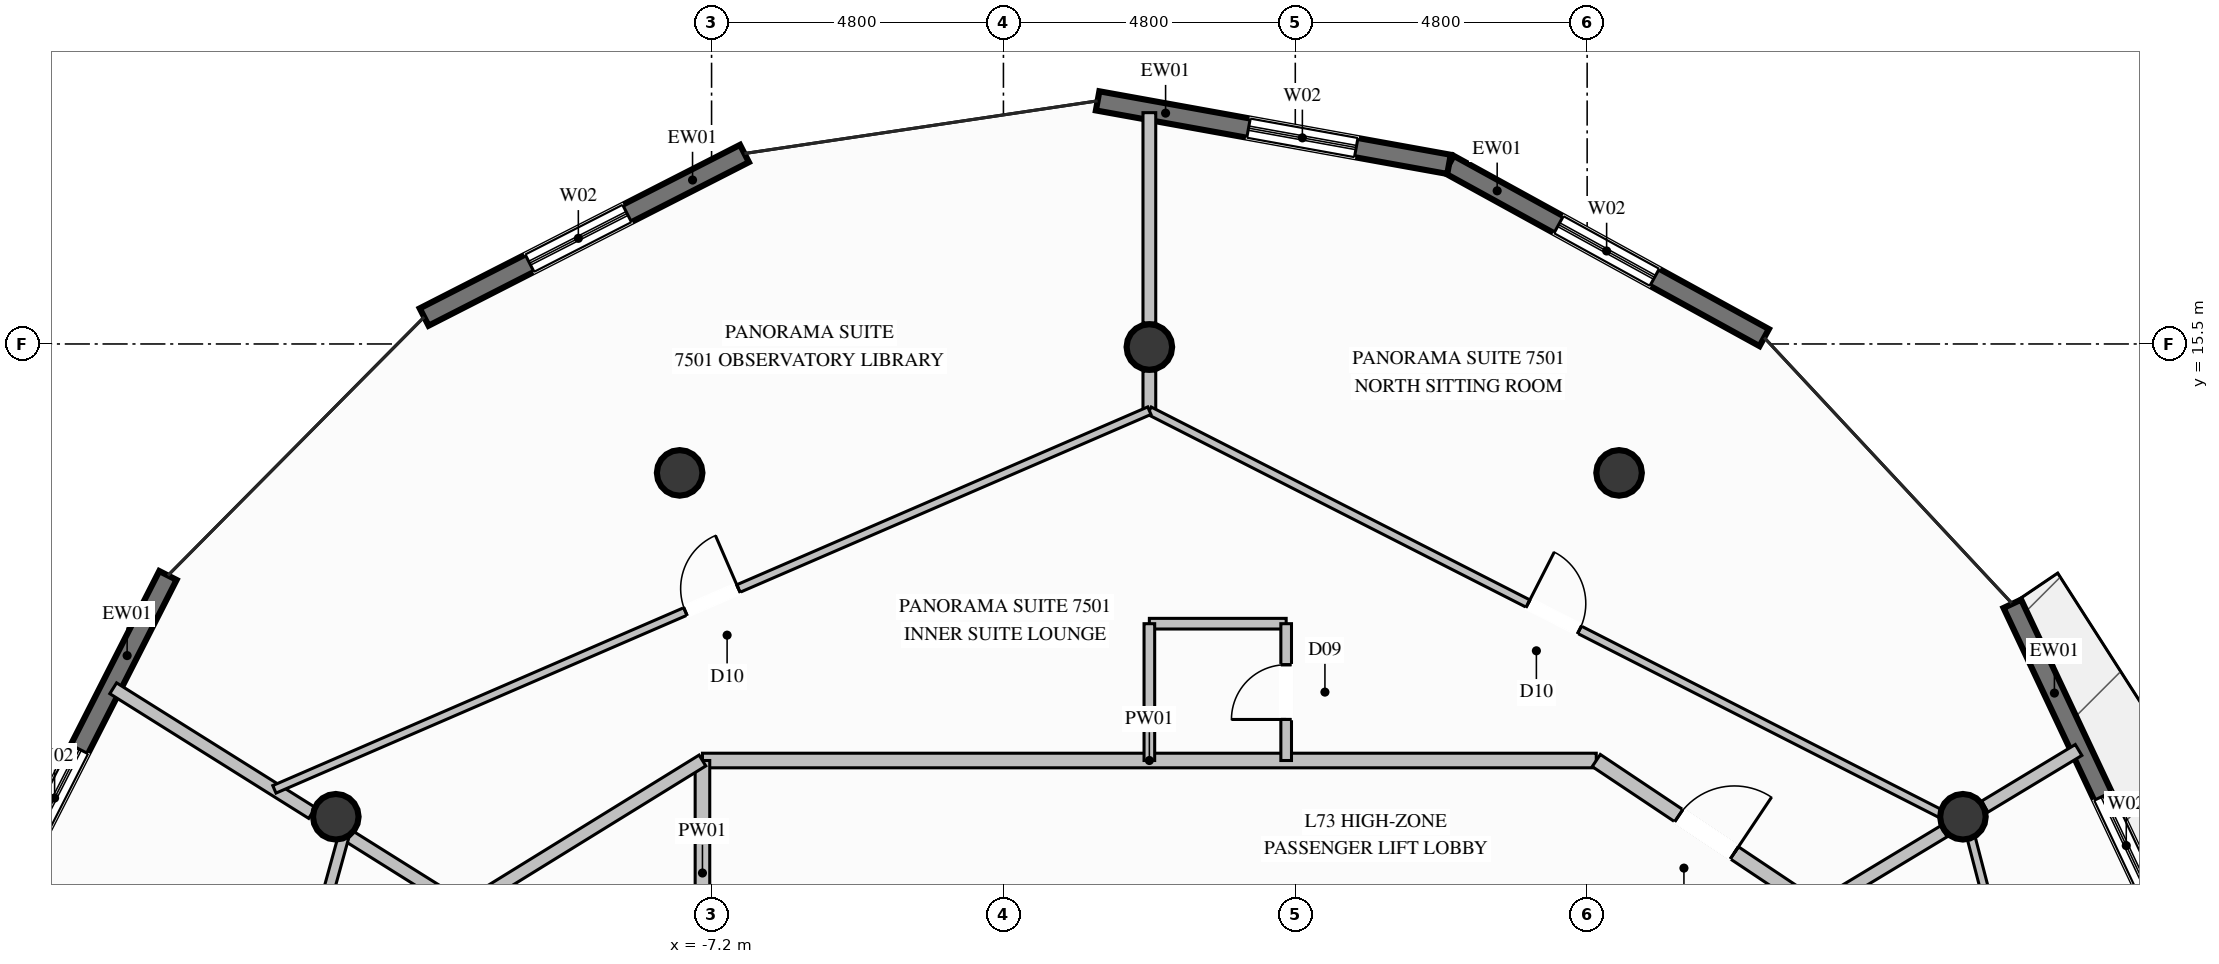
"""IFC4 building model, lengths in metres.
Left out: names, types, materials, properties, quantities, classifications, styles, units other than length and angle.
Written with IfcOpenShell. Run it as: python <this file> out.ifc"""

import sys

from ifc_helpers import new_model, si_unit, direction, frame, frame_2d, origin, origin_2d, place, context, subcontext, project, spatial, rectangle, circle, extrude, element, fill, save


model = new_model("IFC4")
c1 = context("Model", 3, precision=1e-05, world=origin(), true_north=direction((0.0, 1.0)))
c2 = subcontext(c1, "Body", "Model", "MODEL_VIEW")
j1 = project(units=[si_unit("LENGTHUNIT", "METRE"), si_unit("PLANEANGLEUNIT", "RADIAN")], contexts=[c1])
p1 = place(None, origin())
s1 = spatial("IfcSite", under=j1, at=p1, CompositionType="ELEMENT")
p2 = place(p1, origin())
s2 = spatial("IfcBuilding", under=s1, at=p2, CompositionType="ELEMENT")
p3 = place(p2, frame((0.0, 0.0, 282.0)))
s3 = spatial("IfcBuildingStorey", under=s2, at=p3, CompositionType="ELEMENT", Elevation=282.0)
for number, where, z_axis, x_axis in (
    (1, (13.38, 7.725, 0.0), (0.0, 0.0, 1.0), (1.0, 0.0, 0.0)),
    (2, (7.725, 13.38, 0.0), (0.0, 0.0, 1.0), (1.0, 0.0, 0.0)),
    (3, (0.0, 15.45, 0.0), (0.0, 0.0, 1.0), (1.0, 0.0, 0.0)),
    (4, (-7.725, 13.38, 0.0), (0.0, 0.0, 1.0), (1.0, 0.0, 0.0)),
    (5, (-13.38, 7.725, 0.0), (0.0, 0.0, 1.0), (1.0, 0.0, 0.0)),
):
    element("IfcColumn", number, at=place(p3, frame(where, z_axis=z_axis, x_axis=x_axis)), inside=s3, PredefinedType="COLUMN", context=c2, shape_type="SweptSolid", body=[
        extrude(circle(Radius=0.375, at=origin_2d()), origin(), (0.0, 0.0, 1.0), 3.8),
    ])
p4 = place(p3, frame((14.193, 11.227, 0.0), z_axis=(0.0, 0.0, 1.0), x_axis=(0.426183517714, -0.904636727769, 0.0)))
e6 = element("IfcWall", 6, at=p4, inside=s3, PredefinedType="SOLIDWALL", context=c2, shape_type="SweptSolid", body=[
    extrude(rectangle(XDim=6.053, YDim=0.32, at=frame_2d((3.027, 0.0))), origin(), (0.0, 0.0, 1.0), 3.57),
])
p5 = place(p4, frame((3.496, 0.0, 0.35)))
e7 = element("IfcOpeningElement", 7, at=p5, cuts=e6, PredefinedType="OPENING", context=c2, shape_type="SweptSolid", body=[
    extrude(rectangle(XDim=1.8, YDim=2.6, at=frame_2d((0.9, 1.3))), frame((0.0, 0.17, 0.0), z_axis=(0.0, -1.0, 0.0), x_axis=(1.0, 0.0, 0.0)), (0.0, 0.0, 1.0), 0.34),
])
p6 = place(p3, frame((4.928, 18.454, 0.0), z_axis=(0.0, 0.0, 1.0), x_axis=(0.876367486065, -0.481643051822, 0.0)))
e8 = element("IfcWall", 8, at=p6, inside=s3, PredefinedType="SOLIDWALL", context=c2, shape_type="SweptSolid", body=[
    extrude(rectangle(XDim=5.916, YDim=0.32, at=frame_2d((2.958, 0.0))), origin(), (0.0, 0.0, 1.0), 3.57),
])
p7 = place(p6, frame((2.058, 0.0, 0.35)))
e9 = element("IfcOpeningElement", 9, at=p7, cuts=e8, PredefinedType="OPENING", context=c2, shape_type="SweptSolid", body=[
    extrude(rectangle(XDim=1.8, YDim=2.6, at=frame_2d((0.9, 1.3))), frame((0.0, 0.17, 0.0), z_axis=(0.0, -1.0, 0.0), x_axis=(1.0, 0.0, 0.0)), (0.0, 0.0, 1.0), 0.34),
])
p8 = place(p3, frame((-0.851, 19.498, 0.0), z_axis=(0.0, 0.0, 1.0), x_axis=(0.984072814276, -0.177765846557, 0.0)))
e10 = element("IfcWall", 10, at=p8, inside=s3, PredefinedType="SOLIDWALL", context=c2, shape_type="SweptSolid", body=[
    extrude(rectangle(XDim=5.873, YDim=0.32, at=frame_2d((2.936, 0.0))), origin(), (0.0, 0.0, 1.0), 3.57),
])
p9 = place(p8, frame((2.522, 0.0, 0.35)))
e11 = element("IfcOpeningElement", 11, at=p9, cuts=e10, PredefinedType="OPENING", context=c2, shape_type="SweptSolid", body=[
    extrude(rectangle(XDim=1.8, YDim=2.6, at=frame_2d((0.9, 1.3))), frame((0.0, 0.17, 0.0), z_axis=(0.0, -1.0, 0.0), x_axis=(1.0, 0.0, 0.0)), (0.0, 0.0, 1.0), 0.34),
])
p10 = place(p3, frame((-11.927, 15.943, 0.0), z_axis=(0.0, 0.0, 1.0), x_axis=(0.890681374573, 0.454628077651, 0.0)))
e12 = element("IfcWall", 12, at=p10, inside=s3, PredefinedType="SOLIDWALL", context=c2, shape_type="SweptSolid", body=[
    extrude(rectangle(XDim=5.915, YDim=0.32, at=frame_2d((2.957, 0.0))), origin(), (0.0, 0.0, 1.0), 3.57),
])
p11 = place(p10, frame((1.947, 0.0, 0.35)))
e13 = element("IfcOpeningElement", 13, at=p11, cuts=e12, PredefinedType="OPENING", context=c2, shape_type="SweptSolid", body=[
    extrude(rectangle(XDim=1.8, YDim=2.6, at=frame_2d((0.9, 1.3))), frame((0.0, 0.17, 0.0), z_axis=(0.0, -1.0, 0.0), x_axis=(1.0, 0.0, 0.0)), (0.0, 0.0, 1.0), 0.34),
])
p12 = place(p3, frame((-18.888, 6.299, 0.0), z_axis=(0.0, 0.0, 1.0), x_axis=(0.453783790234, 0.891111817743, 0.0)))
e14 = element("IfcWall", 14, at=p12, inside=s3, PredefinedType="SOLIDWALL", context=c2, shape_type="SweptSolid", body=[
    extrude(rectangle(XDim=6.053, YDim=0.32, at=frame_2d((3.027, 0.0))), origin(), (0.0, 0.0, 1.0), 3.57),
])
p13 = place(p12, frame((1.046, 0.0, 0.35)))
e15 = element("IfcOpeningElement", 15, at=p13, cuts=e14, PredefinedType="OPENING", context=c2, shape_type="SweptSolid", body=[
    extrude(rectangle(XDim=1.8, YDim=2.6, at=frame_2d((0.9, 1.3))), frame((0.0, 0.17, 0.0), z_axis=(0.0, -1.0, 0.0), x_axis=(1.0, 0.0, 0.0)), (0.0, 0.0, 1.0), 0.34),
])
p14 = place(p3, frame((-7.35, 8.65, 0.0), z_axis=(0.0, 0.0, 1.0), x_axis=(1.0, 0.0, 0.0)))
e16 = element("IfcWall", 16, at=p14, inside=s3, PredefinedType="PARTITIONING", context=c2, shape_type="SweptSolid", body=[
    extrude(rectangle(XDim=14.7, YDim=0.24, at=frame_2d((7.35, 0.0))), origin(), (0.0, 0.0, 1.0), 3.57),
])
p15 = place(p3, frame((-7.35, 4.95, 0.0), z_axis=(0.0, 0.0, 1.0), x_axis=(0.0, 1.0, 0.0)))
e17 = element("IfcWall", 17, at=p15, inside=s3, PredefinedType="PARTITIONING", context=c2, shape_type="SweptSolid", body=[
    extrude(rectangle(XDim=3.7, YDim=0.24, at=frame_2d((1.85, 0.0))), origin(), (0.0, 0.0, 1.0), 2.655),
])
p16 = place(p3, frame((10.978, 6.225, 0.0), z_axis=(0.0, 0.0, 1.0), x_axis=(0.856173916647, 0.516687743664, 0.0)))
e18 = element("IfcWall", 18, at=p16, inside=s3, PredefinedType="PARTITIONING", context=c2, shape_type="SweptSolid", body=[
    extrude(rectangle(XDim=2.439, YDim=0.21, at=frame_2d((1.219, 0.0))), origin(), (0.0, 0.0, 1.0), 3.085),
])
p17 = place(p3, frame((13.738, 7.891, 0.0), z_axis=(0.0, 0.0, 1.0), x_axis=(0.856140161033, 0.516743674045, 0.0)))
e19 = element("IfcWall", 19, at=p17, inside=s3, PredefinedType="PARTITIONING", context=c2, shape_type="SweptSolid", body=[
    extrude(rectangle(XDim=1.803, YDim=0.21, at=frame_2d((0.902, 0.0))), origin(), (0.0, 0.0, 1.0), 3.57),
])
p18 = place(p3, frame((-11.278, 6.225, 0.0), z_axis=(0.0, 0.0, 1.0), x_axis=(-0.847328563413, 0.531069021525, 0.0)))
e20 = element("IfcWall", 20, at=p18, inside=s3, PredefinedType="PARTITIONING", context=c2, shape_type="SweptSolid", body=[
    extrude(rectangle(XDim=2.214, YDim=0.21, at=frame_2d((1.107, 0.0))), origin(), (0.0, 0.0, 1.0), 3.085),
])
p19 = place(p3, frame((-13.77, 7.787, 0.0), z_axis=(0.0, 0.0, 1.0), x_axis=(-0.847251407525, 0.531192105031, 0.0)))
e21 = element("IfcWall", 21, at=p19, inside=s3, PredefinedType="PARTITIONING", context=c2, shape_type="SweptSolid", body=[
    extrude(rectangle(XDim=3.861, YDim=0.21, at=frame_2d((1.93, 0.0))), origin(), (0.0, 0.0, 1.0), 3.57),
])
p20 = place(p3, frame((0.0, 10.9, 0.0), z_axis=(0.0, 0.0, 1.0), x_axis=(1.0, 0.0, 0.0)))
e22 = element("IfcWall", 22, at=p20, inside=s3, PredefinedType="PLUMBINGWALL", context=c2, shape_type="SweptSolid", body=[
    extrude(rectangle(XDim=2.25, YDim=0.175, at=frame_2d((1.125, 0.0))), origin(), (0.0, 0.0, 1.0), 3.252),
])
p21 = place(p3, frame((0.0, 10.9, 0.0), z_axis=(0.0, 0.0, 1.0), x_axis=(0.0, -1.0, 0.0)))
e23 = element("IfcWall", 23, at=p21, inside=s3, PredefinedType="PLUMBINGWALL", context=c2, shape_type="SweptSolid", body=[
    extrude(rectangle(XDim=2.25, YDim=0.175, at=frame_2d((1.125, 0.0))), origin(), (0.0, 0.0, 1.0), 3.57),
])
p22 = place(p3, frame((2.25, 8.65, 0.0), z_axis=(0.0, 0.0, 1.0), x_axis=(0.0, 1.0, 0.0)))
e24 = element("IfcWall", 24, at=p22, inside=s3, PredefinedType="PLUMBINGWALL", context=c2, shape_type="SweptSolid", body=[
    extrude(rectangle(XDim=2.25, YDim=0.175, at=frame_2d((1.125, 0.0))), origin(), (0.0, 0.0, 1.0), 3.57),
])
p23 = place(p22, frame((0.675, 0.0, 0.0)))
e25 = element("IfcOpeningElement", 25, at=p23, cuts=e24, PredefinedType="OPENING", context=c2, shape_type="SweptSolid", body=[
    extrude(rectangle(XDim=0.9, YDim=2.1, at=frame_2d((0.45, 1.05))), frame((0.0, 0.098, 0.0), z_axis=(0.0, -1.0, 0.0), x_axis=(1.0, 0.0, 0.0)), (0.0, 0.0, 1.0), 0.195),
])
p24 = place(p3, frame((-11.278, 6.225, 0.0), z_axis=(0.0, 0.0, 1.0), x_axis=(0.85092385233, 0.525289060933, 0.0)))
e26 = element("IfcWall", 26, at=p24, inside=s3, PredefinedType="PARTITIONING", context=c2, shape_type="SweptSolid", body=[
    extrude(rectangle(XDim=4.616, YDim=0.21, at=frame_2d((2.308, 0.0))), origin(), (0.0, 0.0, 1.0), 3.57),
])
p25 = place(p3, frame((7.35, 8.65, 0.0), z_axis=(0.0, 0.0, 1.0), x_axis=(0.831395547998, -0.555681062094, 0.0)))
e27 = element("IfcWall", 27, at=p25, inside=s3, PredefinedType="PARTITIONING", context=c2, shape_type="SweptSolid", body=[
    extrude(rectangle(XDim=4.364, YDim=0.24, at=frame_2d((2.182, 0.0))), origin(), (0.0, 0.0, 1.0), 3.57),
])
p26 = place(p25, frame((1.632, 0.0, 0.0)))
e28 = element("IfcOpeningElement", 28, at=p26, cuts=e27, PredefinedType="OPENING", context=c2, shape_type="SweptSolid", body=[
    extrude(rectangle(XDim=1.1, YDim=2.3, at=frame_2d((0.55, 1.15))), frame((0.0, 0.13, 0.0), z_axis=(0.0, -1.0, 0.0), x_axis=(1.0, 0.0, 0.0)), (0.0, 0.0, 1.0), 0.26),
])
p27 = place(p3, frame((0.0, 14.403, 0.0), z_axis=(0.0, 0.0, 1.0), x_axis=(0.0, 1.0, 0.0)))
e29 = element("IfcWall", 29, at=p27, inside=s3, PredefinedType="PARTITIONING", context=c2, shape_type="SweptSolid", body=[
    extrude(rectangle(XDim=0.652, YDim=0.21, at=frame_2d((0.326, 0.0))), origin(), (0.0, 0.0, 1.0), 3.57),
])
p28 = place(p3, frame((0.0, 15.845, 0.0), z_axis=(0.0, 0.0, 1.0), x_axis=(0.0, 1.0, 0.0)))
e30 = element("IfcWall", 30, at=p28, inside=s3, PredefinedType="PARTITIONING", context=c2, shape_type="SweptSolid", body=[
    extrude(rectangle(XDim=3.459, YDim=0.21, at=frame_2d((1.729, 0.0))), origin(), (0.0, 0.0, 1.0), 3.57),
])
p29 = place(p3, frame((0.0, 14.403, 0.0), z_axis=(0.0, 0.0, 1.0), x_axis=(0.89107593803, -0.45385424165, 0.0)))
e31 = element("IfcWall", 31, at=p29, inside=s3, PredefinedType="PARTITIONING", context=c2, shape_type="SweptSolid", body=[
    extrude(rectangle(XDim=14.928, YDim=0.135, at=frame_2d((7.464, 0.0))), origin(), (0.0, 0.0, 1.0), 3.085),
])
p30 = place(p29, frame((6.989, 0.0, 0.0)))
e32 = element("IfcOpeningElement", 32, at=p30, cuts=e31, PredefinedType="OPENING", context=c2, shape_type="SweptSolid", body=[
    extrude(rectangle(XDim=0.95, YDim=2.1, at=frame_2d((0.475, 1.05))), frame((0.0, 0.078, 0.0), z_axis=(0.0, -1.0, 0.0), x_axis=(1.0, 0.0, 0.0)), (0.0, 0.0, 1.0), 0.155),
])
p31 = place(p3, frame((-14.39, 8.176, 0.0), z_axis=(0.0, 0.0, 1.0), x_axis=(0.917754899872, 0.397147257022, 0.0)))
e33 = element("IfcWall", 33, at=p31, inside=s3, PredefinedType="PARTITIONING", context=c2, shape_type="SweptSolid", body=[
    extrude(rectangle(XDim=15.679, YDim=0.135, at=frame_2d((7.84, 0.0))), origin(), (0.0, 0.0, 1.0), 3.57),
])
p32 = place(p31, frame((7.365, 0.0, 0.0)))
e34 = element("IfcOpeningElement", 34, at=p32, cuts=e33, PredefinedType="OPENING", context=c2, shape_type="SweptSolid", body=[
    extrude(rectangle(XDim=0.95, YDim=2.1, at=frame_2d((0.475, 1.05))), frame((0.0, 0.078, 0.0), z_axis=(0.0, -1.0, 0.0), x_axis=(1.0, 0.0, 0.0)), (0.0, 0.0, 1.0), 0.155),
])
p33 = place(p3, frame((-13.237, 7.453, 0.0), z_axis=(0.0, 0.0, 1.0), x_axis=(-0.265653158595, -0.964068669405, 0.0)))
e35 = element("IfcWall", 35, at=p33, inside=s3, PredefinedType="PLUMBINGWALL", context=c2, shape_type="SweptSolid", body=[
    extrude(rectangle(XDim=3.29, YDim=0.175, at=frame_2d((1.645, 0.0))), origin(), (0.0, 0.0, 1.0), 3.137),
])
p34 = place(p3, frame((15.447, -0.065, 0.0), z_axis=(0.0, 0.0, 1.0), x_axis=(-0.251126791961, 0.967954200548, 0.0)))
e36 = element("IfcWall", 36, at=p34, inside=s3, PredefinedType="PARTITIONING", context=c2, shape_type="SweptSolid", body=[
    extrude(rectangle(XDim=8.028, YDim=0.135, at=frame_2d((4.014, 0.0))), origin(), (0.0, 0.0, 1.0), 3.137),
])
p35 = place(p34, frame((3.539, 0.0, 0.0)))
e37 = element("IfcOpeningElement", 37, at=p35, cuts=e36, PredefinedType="OPENING", context=c2, shape_type="SweptSolid", body=[
    extrude(rectangle(XDim=0.95, YDim=2.1, at=frame_2d((0.475, 1.05))), frame((0.0, 0.078, 0.0), z_axis=(0.0, -1.0, 0.0), x_axis=(1.0, 0.0, 0.0)), (0.0, 0.0, 1.0), 0.155),
])
p36 = place(p5, origin())
e38 = element("IfcWindow", 38, at=p36, inside=s3, PartitioningType="SINGLE_PANEL", PredefinedType="WINDOW", context=c2, shape_type="SweptSolid", body=[
    extrude(rectangle(XDim=1.8, YDim=2.6, at=frame_2d((0.9, 1.3))), frame((0.0, 0.03, 0.0), z_axis=(0.0, -1.0, 0.0), x_axis=(1.0, 0.0, 0.0)), (0.0, 0.0, 1.0), 0.06),
])
fill(e7, e38)
p37 = place(p7, origin())
e39 = element("IfcWindow", 39, at=p37, inside=s3, PartitioningType="SINGLE_PANEL", PredefinedType="WINDOW", context=c2, shape_type="SweptSolid", body=[
    extrude(rectangle(XDim=1.8, YDim=2.6, at=frame_2d((0.9, 1.3))), frame((0.0, 0.03, 0.0), z_axis=(0.0, -1.0, 0.0), x_axis=(1.0, 0.0, 0.0)), (0.0, 0.0, 1.0), 0.06),
])
fill(e9, e39)
p38 = place(p9, origin())
e40 = element("IfcWindow", 40, at=p38, inside=s3, PartitioningType="SINGLE_PANEL", PredefinedType="WINDOW", context=c2, shape_type="SweptSolid", body=[
    extrude(rectangle(XDim=1.8, YDim=2.6, at=frame_2d((0.9, 1.3))), frame((0.0, 0.03, 0.0), z_axis=(0.0, -1.0, 0.0), x_axis=(1.0, 0.0, 0.0)), (0.0, 0.0, 1.0), 0.06),
])
fill(e11, e40)
p39 = place(p11, origin())
e41 = element("IfcWindow", 41, at=p39, inside=s3, PartitioningType="SINGLE_PANEL", PredefinedType="WINDOW", context=c2, shape_type="SweptSolid", body=[
    extrude(rectangle(XDim=1.8, YDim=2.6, at=frame_2d((0.9, 1.3))), frame((0.0, 0.03, 0.0), z_axis=(0.0, -1.0, 0.0), x_axis=(1.0, 0.0, 0.0)), (0.0, 0.0, 1.0), 0.06),
])
fill(e13, e41)
p40 = place(p13, origin())
e42 = element("IfcWindow", 42, at=p40, inside=s3, PartitioningType="SINGLE_PANEL", PredefinedType="WINDOW", context=c2, shape_type="SweptSolid", body=[
    extrude(rectangle(XDim=1.8, YDim=2.6, at=frame_2d((0.9, 1.3))), frame((0.0, 0.03, 0.0), z_axis=(0.0, -1.0, 0.0), x_axis=(1.0, 0.0, 0.0)), (0.0, 0.0, 1.0), 0.06),
])
fill(e15, e42)
p41 = place(p23, origin())
e43 = element("IfcDoor", 43, at=p41, inside=s3, OperationType="SINGLE_SWING_LEFT", PredefinedType="DOOR", context=c2, shape_type="SweptSolid", body=[
    extrude(rectangle(XDim=0.9, YDim=2.1, at=frame_2d((0.45, 1.05))), frame((0.0, 0.025, 0.0), z_axis=(0.0, -1.0, 0.0), x_axis=(1.0, 0.0, 0.0)), (0.0, 0.0, 1.0), 0.05),
])
fill(e25, e43)
p42 = place(p26, origin())
e44 = element("IfcDoor", 44, at=p42, inside=s3, OperationType="SINGLE_SWING_RIGHT", PredefinedType="DOOR", context=c2, shape_type="SweptSolid", body=[
    extrude(rectangle(XDim=1.1, YDim=2.3, at=frame_2d((0.55, 1.15))), frame((0.0, 0.025, 0.0), z_axis=(0.0, -1.0, 0.0), x_axis=(1.0, 0.0, 0.0)), (0.0, 0.0, 1.0), 0.05),
])
fill(e28, e44)
p43 = place(p30, origin())
e45 = element("IfcDoor", 45, at=p43, inside=s3, OperationType="SINGLE_SWING_LEFT", PredefinedType="DOOR", context=c2, shape_type="SweptSolid", body=[
    extrude(rectangle(XDim=0.95, YDim=2.1, at=frame_2d((0.475, 1.05))), frame((0.0, 0.025, 0.0), z_axis=(0.0, -1.0, 0.0), x_axis=(1.0, 0.0, 0.0)), (0.0, 0.0, 1.0), 0.05),
])
fill(e32, e45)
p44 = place(p32, origin())
e46 = element("IfcDoor", 46, at=p44, inside=s3, OperationType="SINGLE_SWING_RIGHT", PredefinedType="DOOR", context=c2, shape_type="SweptSolid", body=[
    extrude(rectangle(XDim=0.95, YDim=2.1, at=frame_2d((0.475, 1.05))), frame((0.0, 0.025, 0.0), z_axis=(0.0, -1.0, 0.0), x_axis=(1.0, 0.0, 0.0)), (0.0, 0.0, 1.0), 0.05),
])
fill(e34, e46)
save(model, sys.argv[1])
